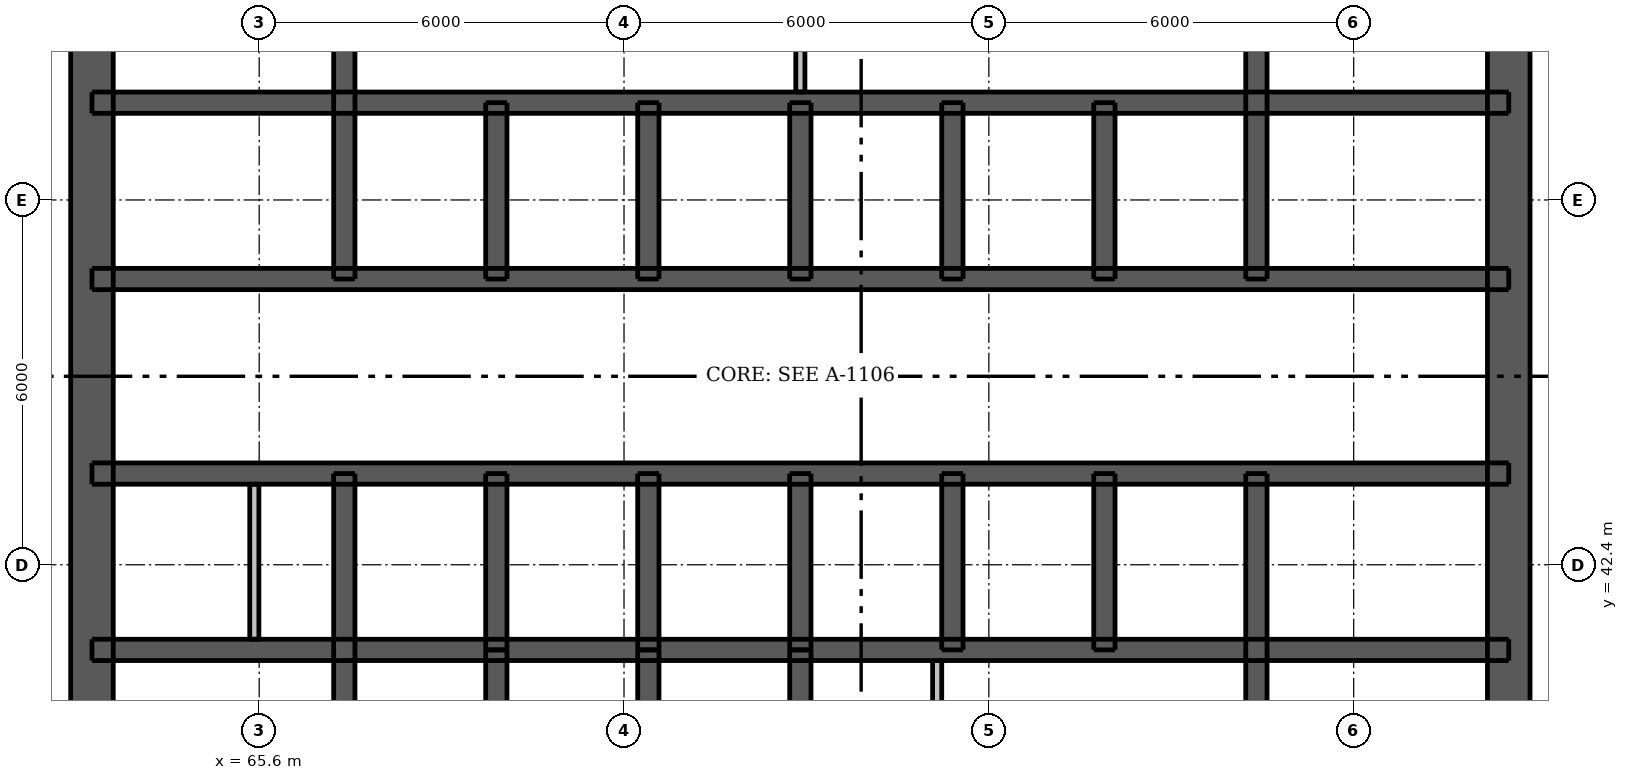
"""IFC4 building model, lengths in metres.
Left out: names, types, materials, properties, quantities, classifications, styles, units other than length and angle.
Written with IfcOpenShell. Run it as: python <this file> out.ifc"""

import sys

from ifc_helpers import new_model, si_unit, direction, frame, frame_2d, origin, place, context, subcontext, project, spatial, rectangle, extrude, element, fill, save


model = new_model("IFC4")
c1 = context("Model", 3, precision=1e-05, world=origin(), true_north=direction((0.0, 1.0)))
c2 = subcontext(c1, "Body", "Model", "MODEL_VIEW")
j1 = project(units=[si_unit("LENGTHUNIT", "METRE"), si_unit("PLANEANGLEUNIT", "RADIAN")], contexts=[c1])
p1 = place(None, origin())
s1 = spatial("IfcSite", under=j1, at=p1, CompositionType="ELEMENT")
p2 = place(p1, origin())
s2 = spatial("IfcBuilding", under=s1, at=p2, CompositionType="ELEMENT")
p3 = place(p2, frame((0.0, 0.0, 171.4)))
s3 = spatial("IfcBuildingStorey", under=s2, at=p3, CompositionType="ELEMENT", Elevation=171.4)
p4 = place(p3, frame((62.85, 33.5, 0.0), z_axis=(0.0, 0.0, 1.0), x_axis=(0.0, 1.0, 0.0)))
e1 = element("IfcWall", 1, at=p4, inside=s3, PredefinedType="SHEAR", context=c2, shape_type="SweptSolid", body=[
    extrude(rectangle(XDim=24.0, YDim=0.7, at=frame_2d((12.0, 0.0))), origin(), (0.0, 0.0, 1.0), 3.05),
])
p5 = place(p4, frame((11.2, 0.0, 0.0)))
e2 = element("IfcOpeningElement", 2, at=p5, cuts=e1, PredefinedType="OPENING", context=c2, shape_type="SweptSolid", body=[
    extrude(rectangle(XDim=1.6, YDim=2.1, at=frame_2d((0.8, 1.05))), frame((0.0, 0.36, 0.0), z_axis=(0.0, -1.0, 0.0), x_axis=(1.0, 0.0, 0.0)), (0.0, 0.0, 1.0), 0.72),
])
p6 = place(p3, frame((86.15, 33.5, 0.0), z_axis=(0.0, 0.0, 1.0), x_axis=(0.0, 1.0, 0.0)))
e3 = element("IfcWall", 3, at=p6, inside=s3, PredefinedType="SHEAR", context=c2, shape_type="SweptSolid", body=[
    extrude(rectangle(XDim=24.0, YDim=0.7, at=frame_2d((12.0, 0.0))), origin(), (0.0, 0.0, 1.0), 3.05),
])
p7 = place(p6, frame((11.2, 0.0, 0.0)))
e4 = element("IfcOpeningElement", 4, at=p7, cuts=e3, PredefinedType="OPENING", context=c2, shape_type="SweptSolid", body=[
    extrude(rectangle(XDim=1.6, YDim=2.1, at=frame_2d((0.8, 1.05))), frame((0.0, 0.36, 0.0), z_axis=(0.0, -1.0, 0.0), x_axis=(1.0, 0.0, 0.0)), (0.0, 0.0, 1.0), 0.72),
])
p8 = place(p3, frame((62.85, 41.0, 0.0), z_axis=(0.0, 0.0, 1.0), x_axis=(1.0, 0.0, 0.0)))
e5 = element("IfcWall", 5, at=p8, inside=s3, PredefinedType="SHEAR", context=c2, shape_type="SweptSolid", body=[
    extrude(rectangle(XDim=23.3, YDim=0.35, at=frame_2d((11.65, 0.0))), origin(), (0.0, 0.0, 1.0), 3.05),
])
p9 = place(p3, frame((62.85, 43.9, 0.0), z_axis=(0.0, 0.0, 1.0), x_axis=(1.0, 0.0, 0.0)))
e6 = element("IfcWall", 6, at=p9, inside=s3, PredefinedType="SHEAR", context=c2, shape_type="SweptSolid", body=[
    extrude(rectangle(XDim=23.3, YDim=0.35, at=frame_2d((11.65, 0.0))), origin(), (0.0, 0.0, 1.0), 3.05),
])
p10 = place(p9, frame((1.06, 0.0, 0.0)))
e7 = element("IfcOpeningElement", 7, at=p10, cuts=e6, PredefinedType="OPENING", context=c2, shape_type="SweptSolid", body=[
    extrude(rectangle(XDim=0.9, YDim=2.1, at=frame_2d((0.45, 1.05))), frame((0.0, 0.185, 0.0), z_axis=(0.0, -1.0, 0.0), x_axis=(1.0, 0.0, 0.0)), (0.0, 0.0, 1.0), 0.37),
])
p11 = place(p9, frame((2.923, 0.0, 0.0)))
e8 = element("IfcOpeningElement", 8, at=p11, cuts=e6, PredefinedType="OPENING", context=c2, shape_type="SweptSolid", body=[
    extrude(rectangle(XDim=0.8, YDim=2.1, at=frame_2d((0.4, 1.05))), frame((0.0, 0.185, 0.0), z_axis=(0.0, -1.0, 0.0), x_axis=(1.0, 0.0, 0.0)), (0.0, 0.0, 1.0), 0.37),
])
p12 = place(p9, frame((20.688, 0.0, 0.0)))
e9 = element("IfcOpeningElement", 9, at=p12, cuts=e6, PredefinedType="OPENING", context=c2, shape_type="SweptSolid", body=[
    extrude(rectangle(XDim=0.9, YDim=2.1, at=frame_2d((0.45, 1.05))), frame((0.0, 0.185, 0.0), z_axis=(0.0, -1.0, 0.0), x_axis=(1.0, 0.0, 0.0)), (0.0, 0.0, 1.0), 0.37),
])
p13 = place(p9, frame((4.95, 0.0, 0.0)))
e10 = element("IfcOpeningElement", 10, at=p13, cuts=e6, PredefinedType="OPENING", context=c2, shape_type="SweptSolid", body=[
    extrude(rectangle(XDim=0.9, YDim=2.1, at=frame_2d((0.45, 1.05))), frame((0.0, 0.185, 0.0), z_axis=(0.0, -1.0, 0.0), x_axis=(1.0, 0.0, 0.0)), (0.0, 0.0, 1.0), 0.37),
])
p14 = place(p9, frame((7.45, 0.0, 0.0)))
e11 = element("IfcOpeningElement", 11, at=p14, cuts=e6, PredefinedType="OPENING", context=c2, shape_type="SweptSolid", body=[
    extrude(rectangle(XDim=0.9, YDim=2.1, at=frame_2d((0.45, 1.05))), frame((0.0, 0.185, 0.0), z_axis=(0.0, -1.0, 0.0), x_axis=(1.0, 0.0, 0.0)), (0.0, 0.0, 1.0), 0.37),
])
p15 = place(p9, frame((12.45, 0.0, 0.0)))
e12 = element("IfcOpeningElement", 12, at=p15, cuts=e6, PredefinedType="OPENING", context=c2, shape_type="SweptSolid", body=[
    extrude(rectangle(XDim=0.9, YDim=2.1, at=frame_2d((0.45, 1.05))), frame((0.0, 0.185, 0.0), z_axis=(0.0, -1.0, 0.0), x_axis=(1.0, 0.0, 0.0)), (0.0, 0.0, 1.0), 0.37),
])
p16 = place(p9, frame((14.95, 0.0, 0.0)))
e13 = element("IfcOpeningElement", 13, at=p16, cuts=e6, PredefinedType="OPENING", context=c2, shape_type="SweptSolid", body=[
    extrude(rectangle(XDim=0.9, YDim=2.1, at=frame_2d((0.45, 1.05))), frame((0.0, 0.185, 0.0), z_axis=(0.0, -1.0, 0.0), x_axis=(1.0, 0.0, 0.0)), (0.0, 0.0, 1.0), 0.37),
])
p17 = place(p3, frame((62.85, 47.1, 0.0), z_axis=(0.0, 0.0, 1.0), x_axis=(1.0, 0.0, 0.0)))
e14 = element("IfcWall", 14, at=p17, inside=s3, PredefinedType="SHEAR", context=c2, shape_type="SweptSolid", body=[
    extrude(rectangle(XDim=23.3, YDim=0.35, at=frame_2d((11.65, 0.0))), origin(), (0.0, 0.0, 1.0), 3.05),
])
p18 = place(p17, frame((1.712, 0.0, 0.0)))
e15 = element("IfcOpeningElement", 15, at=p18, cuts=e14, PredefinedType="OPENING", context=c2, shape_type="SweptSolid", body=[
    extrude(rectangle(XDim=0.9, YDim=2.1, at=frame_2d((0.45, 1.05))), frame((0.0, 0.185, 0.0), z_axis=(0.0, -1.0, 0.0), x_axis=(1.0, 0.0, 0.0)), (0.0, 0.0, 1.0), 0.37),
])
p19 = place(p17, frame((20.688, 0.0, 0.0)))
e16 = element("IfcOpeningElement", 16, at=p19, cuts=e14, PredefinedType="OPENING", context=c2, shape_type="SweptSolid", body=[
    extrude(rectangle(XDim=0.9, YDim=2.1, at=frame_2d((0.45, 1.05))), frame((0.0, 0.185, 0.0), z_axis=(0.0, -1.0, 0.0), x_axis=(1.0, 0.0, 0.0)), (0.0, 0.0, 1.0), 0.37),
])
p20 = place(p17, frame((4.85, 0.0, 0.0)))
e17 = element("IfcOpeningElement", 17, at=p20, cuts=e14, PredefinedType="OPENING", context=c2, shape_type="SweptSolid", body=[
    extrude(rectangle(XDim=1.1, YDim=2.1, at=frame_2d((0.55, 1.05))), frame((0.0, 0.185, 0.0), z_axis=(0.0, -1.0, 0.0), x_axis=(1.0, 0.0, 0.0)), (0.0, 0.0, 1.0), 0.37),
])
p21 = place(p17, frame((7.35, 0.0, 0.0)))
e18 = element("IfcOpeningElement", 18, at=p21, cuts=e14, PredefinedType="OPENING", context=c2, shape_type="SweptSolid", body=[
    extrude(rectangle(XDim=1.1, YDim=2.1, at=frame_2d((0.55, 1.05))), frame((0.0, 0.185, 0.0), z_axis=(0.0, -1.0, 0.0), x_axis=(1.0, 0.0, 0.0)), (0.0, 0.0, 1.0), 0.37),
])
p22 = place(p17, frame((9.85, 0.0, 0.0)))
e19 = element("IfcOpeningElement", 19, at=p22, cuts=e14, PredefinedType="OPENING", context=c2, shape_type="SweptSolid", body=[
    extrude(rectangle(XDim=1.1, YDim=2.1, at=frame_2d((0.55, 1.05))), frame((0.0, 0.185, 0.0), z_axis=(0.0, -1.0, 0.0), x_axis=(1.0, 0.0, 0.0)), (0.0, 0.0, 1.0), 0.37),
])
p23 = place(p17, frame((12.35, 0.0, 0.0)))
e20 = element("IfcOpeningElement", 20, at=p23, cuts=e14, PredefinedType="OPENING", context=c2, shape_type="SweptSolid", body=[
    extrude(rectangle(XDim=1.1, YDim=2.1, at=frame_2d((0.55, 1.05))), frame((0.0, 0.185, 0.0), z_axis=(0.0, -1.0, 0.0), x_axis=(1.0, 0.0, 0.0)), (0.0, 0.0, 1.0), 0.37),
])
p24 = place(p17, frame((14.85, 0.0, 0.0)))
e21 = element("IfcOpeningElement", 21, at=p24, cuts=e14, PredefinedType="OPENING", context=c2, shape_type="SweptSolid", body=[
    extrude(rectangle(XDim=1.1, YDim=2.1, at=frame_2d((0.55, 1.05))), frame((0.0, 0.185, 0.0), z_axis=(0.0, -1.0, 0.0), x_axis=(1.0, 0.0, 0.0)), (0.0, 0.0, 1.0), 0.37),
])
p25 = place(p17, frame((17.35, 0.0, 0.0)))
e22 = element("IfcOpeningElement", 22, at=p25, cuts=e14, PredefinedType="OPENING", context=c2, shape_type="SweptSolid", body=[
    extrude(rectangle(XDim=1.1, YDim=2.1, at=frame_2d((0.55, 1.05))), frame((0.0, 0.185, 0.0), z_axis=(0.0, -1.0, 0.0), x_axis=(1.0, 0.0, 0.0)), (0.0, 0.0, 1.0), 0.37),
])
p26 = place(p3, frame((62.85, 50.0, 0.0), z_axis=(0.0, 0.0, 1.0), x_axis=(1.0, 0.0, 0.0)))
e23 = element("IfcWall", 23, at=p26, inside=s3, PredefinedType="SHEAR", context=c2, shape_type="SweptSolid", body=[
    extrude(rectangle(XDim=23.3, YDim=0.35, at=frame_2d((11.65, 0.0))), origin(), (0.0, 0.0, 1.0), 3.05),
])
p27 = place(p3, frame((67.0, 33.85, 0.0), z_axis=(0.0, 0.0, 1.0), x_axis=(0.0, 1.0, 0.0)))
e24 = element("IfcWall", 24, at=p27, inside=s3, PredefinedType="SHEAR", context=c2, shape_type="SweptSolid", body=[
    extrude(rectangle(XDim=10.05, YDim=0.35, at=frame_2d((5.025, 0.0))), origin(), (0.0, 0.0, 1.0), 3.05),
])
p28 = place(p27, frame((0.55, 0.0, 0.0)))
e25 = element("IfcOpeningElement", 25, at=p28, cuts=e24, PredefinedType="OPENING", context=c2, shape_type="SweptSolid", body=[
    extrude(rectangle(XDim=1.1, YDim=2.1, at=frame_2d((0.55, 1.05))), frame((0.0, 0.185, 0.0), z_axis=(0.0, -1.0, 0.0), x_axis=(1.0, 0.0, 0.0)), (0.0, 0.0, 1.0), 0.37),
])
for number, where, z_axis, x_axis in (
    (26, (67.0, 47.1, 0.0), (0.0, 0.0, 1.0), (0.0, 1.0, 0.0)),
    (27, (82.0, 33.85, 0.0), (0.0, 0.0, 1.0), (0.0, 1.0, 0.0)),
    (28, (82.0, 47.1, 0.0), (0.0, 0.0, 1.0), (0.0, 1.0, 0.0)),
):
    element("IfcWall", number, at=place(p3, frame(where, z_axis=z_axis, x_axis=x_axis)), inside=s3, PredefinedType="SHEAR", context=c2, shape_type="SweptSolid", body=[
        extrude(rectangle(XDim=10.05, YDim=0.35, at=frame_2d((5.025, 0.0))), origin(), (0.0, 0.0, 1.0), 3.05),
    ])
for number, where, z_axis, x_axis in (
    (29, (69.5, 41.0, 0.0), (0.0, 0.0, 1.0), (0.0, 1.0, 0.0)),
    (30, (69.5, 47.1, 0.0), (0.0, 0.0, 1.0), (0.0, 1.0, 0.0)),
    (31, (72.0, 41.0, 0.0), (0.0, 0.0, 1.0), (0.0, 1.0, 0.0)),
    (32, (72.0, 47.1, 0.0), (0.0, 0.0, 1.0), (0.0, 1.0, 0.0)),
    (33, (74.5, 41.0, 0.0), (0.0, 0.0, 1.0), (0.0, 1.0, 0.0)),
    (34, (74.5, 47.1, 0.0), (0.0, 0.0, 1.0), (0.0, 1.0, 0.0)),
    (35, (77.0, 41.0, 0.0), (0.0, 0.0, 1.0), (0.0, 1.0, 0.0)),
    (36, (77.0, 47.1, 0.0), (0.0, 0.0, 1.0), (0.0, 1.0, 0.0)),
    (37, (79.5, 41.0, 0.0), (0.0, 0.0, 1.0), (0.0, 1.0, 0.0)),
    (38, (79.5, 47.1, 0.0), (0.0, 0.0, 1.0), (0.0, 1.0, 0.0)),
    (39, (69.5, 38.1, 0.0), (0.0, 0.0, 1.0), (0.0, 1.0, 0.0)),
    (40, (72.0, 38.1, 0.0), (0.0, 0.0, 1.0), (0.0, 1.0, 0.0)),
    (41, (74.5, 38.1, 0.0), (0.0, 0.0, 1.0), (0.0, 1.0, 0.0)),
):
    element("IfcWall", number, at=place(p3, frame(where, z_axis=z_axis, x_axis=x_axis)), inside=s3, PredefinedType="SHEAR", context=c2, shape_type="SweptSolid", body=[
        extrude(rectangle(XDim=2.9, YDim=0.35, at=frame_2d((1.45, 0.0))), origin(), (0.0, 0.0, 1.0), 3.05),
    ])
p29 = place(p3, frame((76.75, 34.2, 0.0), z_axis=(0.0, 0.0, 1.0), x_axis=(0.0, 1.0, 0.0)))
e42 = element("IfcWall", 42, at=p29, inside=s3, PredefinedType="PLUMBINGWALL", context=c2, shape_type="SweptSolid", body=[
    extrude(rectangle(XDim=6.625, YDim=0.15, at=frame_2d((3.312, 0.0))), origin(), (0.0, 0.0, 1.0), 3.05),
])
p30 = place(p3, frame((65.52, 41.175, 0.0), z_axis=(0.0, 0.0, 1.0), x_axis=(0.0, 1.0, 0.0)))
e43 = element("IfcWall", 43, at=p30, inside=s3, PredefinedType="PLUMBINGWALL", context=c2, shape_type="SweptSolid", body=[
    extrude(rectangle(XDim=2.55, YDim=0.15, at=frame_2d((1.275, 0.0))), origin(), (0.0, 0.0, 1.0), 3.05),
])
p31 = place(p3, frame((74.5, 50.175, 0.0), z_axis=(0.0, 0.0, 1.0), x_axis=(0.0, 1.0, 0.0)))
e44 = element("IfcWall", 44, at=p31, inside=s3, PredefinedType="PLUMBINGWALL", context=c2, shape_type="SweptSolid", body=[
    extrude(rectangle(XDim=6.625, YDim=0.15, at=frame_2d((3.312, 0.0))), origin(), (0.0, 0.0, 1.0), 3.05),
])
p32 = place(p5, origin())
e45 = element("IfcDoor", 45, at=p32, inside=s3, OperationType="DOUBLE_DOOR_SINGLE_SWING", PredefinedType="DOOR", context=c2, shape_type="SweptSolid", body=[
    extrude(rectangle(XDim=1.6, YDim=2.1, at=frame_2d((0.8, 1.05))), frame((0.0, -0.288, 0.0), z_axis=(0.0, -1.0, 0.0), x_axis=(1.0, 0.0, 0.0)), (0.0, 0.0, 1.0), 0.05),
])
fill(e2, e45)
p33 = place(p7, origin())
e46 = element("IfcDoor", 46, at=p33, inside=s3, OperationType="DOUBLE_DOOR_SINGLE_SWING", PredefinedType="DOOR", context=c2, shape_type="SweptSolid", body=[
    extrude(rectangle(XDim=1.6, YDim=2.1, at=frame_2d((0.8, 1.05))), frame((0.0, 0.337, 0.0), z_axis=(0.0, -1.0, 0.0), x_axis=(1.0, 0.0, 0.0)), (0.0, 0.0, 1.0), 0.05),
])
fill(e4, e46)
p34 = place(p10, origin())
e47 = element("IfcDoor", 47, at=p34, inside=s3, OperationType="SINGLE_SWING_LEFT", PredefinedType="DOOR", context=c2, shape_type="SweptSolid", body=[
    extrude(rectangle(XDim=0.9, YDim=2.1, at=frame_2d((0.45, 1.05))), frame((0.0, -0.112, 0.0), z_axis=(0.0, -1.0, 0.0), x_axis=(1.0, 0.0, 0.0)), (0.0, 0.0, 1.0), 0.05),
])
fill(e7, e47)
p35 = place(p11, origin())
e48 = element("IfcDoor", 48, at=p35, inside=s3, OperationType="SINGLE_SWING_RIGHT", PredefinedType="DOOR", context=c2, shape_type="SweptSolid", body=[
    extrude(rectangle(XDim=0.8, YDim=2.1, at=frame_2d((0.4, 1.05))), frame((0.0, -0.112, 0.0), z_axis=(0.0, -1.0, 0.0), x_axis=(1.0, 0.0, 0.0)), (0.0, 0.0, 1.0), 0.05),
])
fill(e8, e48)
p36 = place(p12, origin())
e49 = element("IfcDoor", 49, at=p36, inside=s3, OperationType="SINGLE_SWING_LEFT", PredefinedType="DOOR", context=c2, shape_type="SweptSolid", body=[
    extrude(rectangle(XDim=0.9, YDim=2.1, at=frame_2d((0.45, 1.05))), frame((0.0, -0.112, 0.0), z_axis=(0.0, -1.0, 0.0), x_axis=(1.0, 0.0, 0.0)), (0.0, 0.0, 1.0), 0.05),
])
fill(e9, e49)
p37 = place(p18, origin())
e50 = element("IfcDoor", 50, at=p37, inside=s3, OperationType="SINGLE_SWING_LEFT", PredefinedType="DOOR", context=c2, shape_type="SweptSolid", body=[
    extrude(rectangle(XDim=0.9, YDim=2.1, at=frame_2d((0.45, 1.05))), frame((0.0, 0.163, 0.0), z_axis=(0.0, -1.0, 0.0), x_axis=(1.0, 0.0, 0.0)), (0.0, 0.0, 1.0), 0.05),
])
fill(e15, e50)
p38 = place(p19, origin())
e51 = element("IfcDoor", 51, at=p38, inside=s3, OperationType="SINGLE_SWING_LEFT", PredefinedType="DOOR", context=c2, shape_type="SweptSolid", body=[
    extrude(rectangle(XDim=0.9, YDim=2.1, at=frame_2d((0.45, 1.05))), frame((0.0, 0.163, 0.0), z_axis=(0.0, -1.0, 0.0), x_axis=(1.0, 0.0, 0.0)), (0.0, 0.0, 1.0), 0.05),
])
fill(e16, e51)
p39 = place(p13, origin())
e52 = element("IfcDoor", 52, at=p39, inside=s3, OperationType="SINGLE_SWING_RIGHT", PredefinedType="DOOR", context=c2, shape_type="SweptSolid", body=[
    extrude(rectangle(XDim=0.9, YDim=2.1, at=frame_2d((0.45, 1.05))), frame((0.0, -0.112, 0.0), z_axis=(0.0, -1.0, 0.0), x_axis=(1.0, 0.0, 0.0)), (0.0, 0.0, 1.0), 0.05),
])
fill(e10, e52)
p40 = place(p14, origin())
e53 = element("IfcDoor", 53, at=p40, inside=s3, OperationType="SINGLE_SWING_LEFT", PredefinedType="DOOR", context=c2, shape_type="SweptSolid", body=[
    extrude(rectangle(XDim=0.9, YDim=2.1, at=frame_2d((0.45, 1.05))), frame((0.0, -0.112, 0.0), z_axis=(0.0, -1.0, 0.0), x_axis=(1.0, 0.0, 0.0)), (0.0, 0.0, 1.0), 0.05),
])
fill(e11, e53)
p41 = place(p15, origin())
e54 = element("IfcDoor", 54, at=p41, inside=s3, OperationType="SINGLE_SWING_LEFT", PredefinedType="DOOR", context=c2, shape_type="SweptSolid", body=[
    extrude(rectangle(XDim=0.9, YDim=2.1, at=frame_2d((0.45, 1.05))), frame((0.0, -0.112, 0.0), z_axis=(0.0, -1.0, 0.0), x_axis=(1.0, 0.0, 0.0)), (0.0, 0.0, 1.0), 0.05),
])
fill(e12, e54)
p42 = place(p16, origin())
e55 = element("IfcDoor", 55, at=p42, inside=s3, OperationType="SINGLE_SWING_RIGHT", PredefinedType="DOOR", context=c2, shape_type="SweptSolid", body=[
    extrude(rectangle(XDim=0.9, YDim=2.1, at=frame_2d((0.45, 1.05))), frame((0.0, -0.112, 0.0), z_axis=(0.0, -1.0, 0.0), x_axis=(1.0, 0.0, 0.0)), (0.0, 0.0, 1.0), 0.05),
])
fill(e13, e55)
p43 = place(p20, origin())
e56 = element("IfcDoor", 56, at=p43, inside=s3, OperationType="DOUBLE_DOOR_SLIDING", PredefinedType="DOOR", context=c2, shape_type="SweptSolid", body=[
    extrude(rectangle(XDim=1.1, YDim=2.1, at=frame_2d((0.55, 1.05))), frame((0.0, 0.025, 0.0), z_axis=(0.0, -1.0, 0.0), x_axis=(1.0, 0.0, 0.0)), (0.0, 0.0, 1.0), 0.05),
])
fill(e17, e56)
p44 = place(p21, origin())
e57 = element("IfcDoor", 57, at=p44, inside=s3, OperationType="DOUBLE_DOOR_SLIDING", PredefinedType="DOOR", context=c2, shape_type="SweptSolid", body=[
    extrude(rectangle(XDim=1.1, YDim=2.1, at=frame_2d((0.55, 1.05))), frame((0.0, 0.025, 0.0), z_axis=(0.0, -1.0, 0.0), x_axis=(1.0, 0.0, 0.0)), (0.0, 0.0, 1.0), 0.05),
])
fill(e18, e57)
p45 = place(p22, origin())
e58 = element("IfcDoor", 58, at=p45, inside=s3, OperationType="DOUBLE_DOOR_SLIDING", PredefinedType="DOOR", context=c2, shape_type="SweptSolid", body=[
    extrude(rectangle(XDim=1.1, YDim=2.1, at=frame_2d((0.55, 1.05))), frame((0.0, 0.025, 0.0), z_axis=(0.0, -1.0, 0.0), x_axis=(1.0, 0.0, 0.0)), (0.0, 0.0, 1.0), 0.05),
])
fill(e19, e58)
p46 = place(p23, origin())
e59 = element("IfcDoor", 59, at=p46, inside=s3, OperationType="DOUBLE_DOOR_SLIDING", PredefinedType="DOOR", context=c2, shape_type="SweptSolid", body=[
    extrude(rectangle(XDim=1.1, YDim=2.1, at=frame_2d((0.55, 1.05))), frame((0.0, 0.025, 0.0), z_axis=(0.0, -1.0, 0.0), x_axis=(1.0, 0.0, 0.0)), (0.0, 0.0, 1.0), 0.05),
])
fill(e20, e59)
p47 = place(p24, origin())
e60 = element("IfcDoor", 60, at=p47, inside=s3, OperationType="DOUBLE_DOOR_SLIDING", PredefinedType="DOOR", context=c2, shape_type="SweptSolid", body=[
    extrude(rectangle(XDim=1.1, YDim=2.1, at=frame_2d((0.55, 1.05))), frame((0.0, 0.025, 0.0), z_axis=(0.0, -1.0, 0.0), x_axis=(1.0, 0.0, 0.0)), (0.0, 0.0, 1.0), 0.05),
])
fill(e21, e60)
p48 = place(p25, origin())
e61 = element("IfcDoor", 61, at=p48, inside=s3, OperationType="DOUBLE_DOOR_SLIDING", PredefinedType="DOOR", context=c2, shape_type="SweptSolid", body=[
    extrude(rectangle(XDim=1.1, YDim=2.1, at=frame_2d((0.55, 1.05))), frame((0.0, 0.025, 0.0), z_axis=(0.0, -1.0, 0.0), x_axis=(1.0, 0.0, 0.0)), (0.0, 0.0, 1.0), 0.05),
])
fill(e22, e61)
save(model, sys.argv[1])
